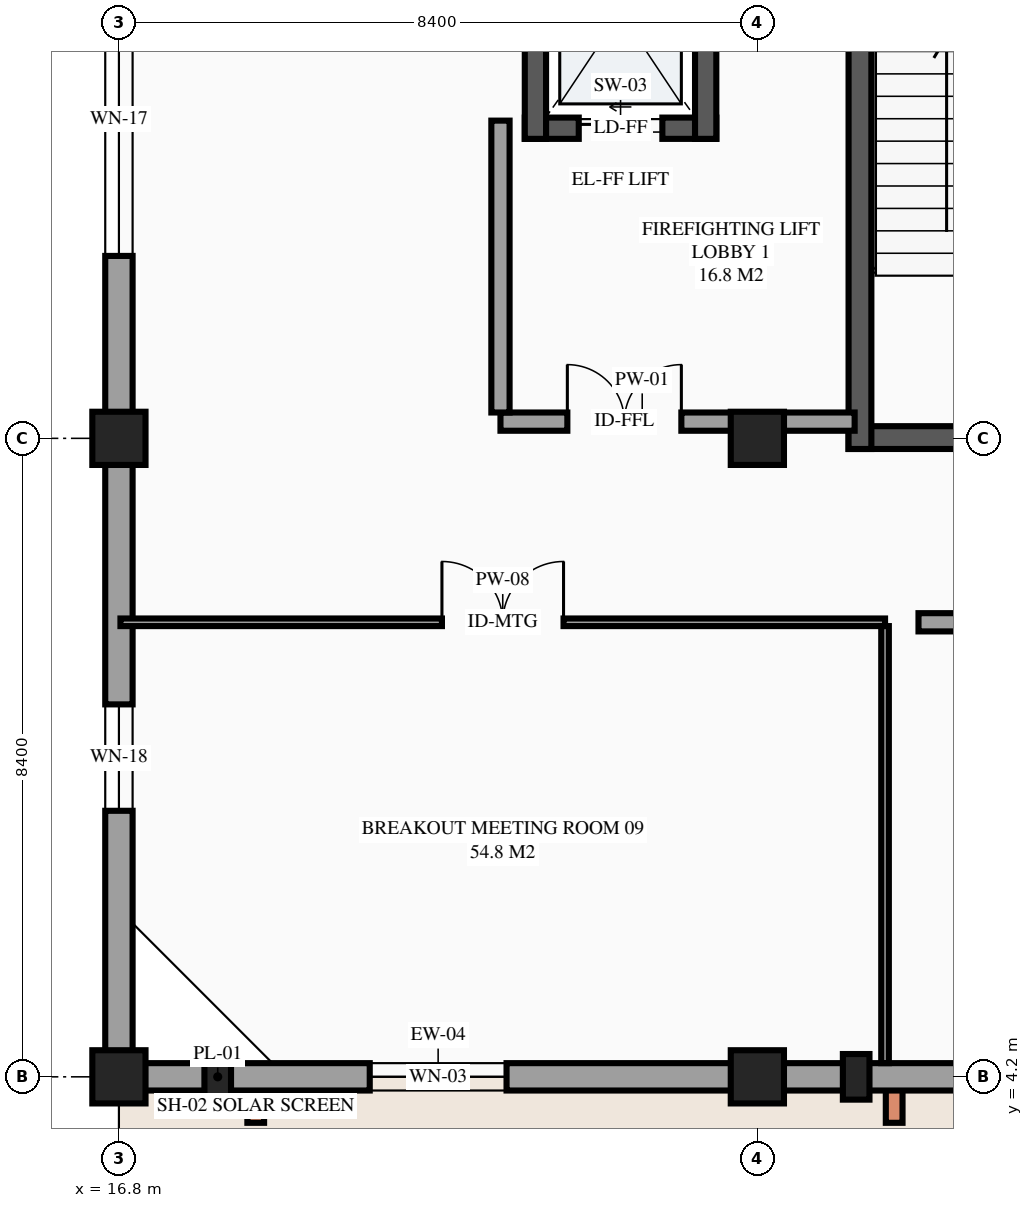
"""IFC4 building model, lengths in metres.
Left out: names, types, materials, properties, quantities, classifications, styles, units other than length and angle.
Written with IfcOpenShell. Run it as: python <this file> out.ifc"""

import sys

from ifc_helpers import new_model, si_unit, direction, frame, frame_2d, origin, origin_2d, place, context, subcontext, project, spatial, rectangle, extrude, element, fill, save


model = new_model("IFC4")
c1 = context("Model", 3, precision=1e-05, world=origin(), true_north=direction((0.0, 1.0)))
c2 = subcontext(c1, "Body", "Model", "MODEL_VIEW")
j1 = project(units=[si_unit("LENGTHUNIT", "METRE"), si_unit("PLANEANGLEUNIT", "RADIAN")], contexts=[c1])
p1 = place(None, origin())
s1 = spatial("IfcSite", under=j1, at=p1, CompositionType="ELEMENT")
p2 = place(p1, origin())
s2 = spatial("IfcBuilding", under=s1, at=p2, CompositionType="ELEMENT")
p3 = place(p2, frame((0.0, 0.0, 9.9)))
s3 = spatial("IfcBuildingStorey", under=s2, at=p3, CompositionType="ELEMENT", Elevation=9.9)
for number, where, z_axis, x_axis in (
    (1, (16.8, 4.2, 0.0), (0.0, 0.0, 1.0), (1.0, 0.0, 0.0)),
    (2, (16.8, 12.6, 0.0), (0.0, 0.0, 1.0), (1.0, 0.0, 0.0)),
    (3, (25.2, 4.2, 0.0), (0.0, 0.0, 1.0), (1.0, 0.0, 0.0)),
    (4, (25.2, 12.6, 0.0), (0.0, 0.0, 1.0), (1.0, 0.0, 0.0)),
):
    element("IfcColumn", number, at=place(p3, frame(where, z_axis=z_axis, x_axis=x_axis)), inside=s3, PredefinedType="COLUMN", context=c2, shape_type="SweptSolid", body=[
        extrude(rectangle(XDim=0.7, YDim=0.7, at=origin_2d()), origin(), (0.0, 0.0, 1.0), 4.2),
    ])
for number, where, z_axis, x_axis in (
    (5, (18.1, 4.2, 0.0), (0.0, 0.0, 1.0), (1.0, 0.0, 0.0)),
    (6, (26.5, 4.2, 0.0), (0.0, 0.0, 1.0), (1.0, 0.0, 0.0)),
):
    element("IfcColumn", number, at=place(p3, frame(where, z_axis=z_axis, x_axis=x_axis)), inside=s3, PredefinedType="PILASTER", context=c2, shape_type="SweptSolid", body=[
        extrude(rectangle(XDim=0.35, YDim=0.6, at=origin_2d()), origin(), (0.0, 0.0, 1.0), 4.2),
    ])
p4 = place(p3, frame((16.8, 4.2, 0.0), z_axis=(0.0, 0.0, 1.0), x_axis=(1.0, 0.0, 0.0)))
e7 = element("IfcWall", 7, at=p4, inside=s3, PredefinedType="STANDARD", context=c2, shape_type="SweptSolid", body=[
    extrude(rectangle(XDim=8.4, YDim=0.36, at=frame_2d((4.2, 0.0))), origin(), (0.0, 0.0, 1.0), 3.713),
])
p5 = place(p4, frame((3.3, 0.0, 0.75)))
e8 = element("IfcOpeningElement", 8, at=p5, cuts=e7, PredefinedType="OPENING", context=c2, shape_type="SweptSolid", body=[
    extrude(rectangle(XDim=1.8, YDim=1.5, at=frame_2d((0.9, 0.75))), frame((0.0, 0.19, 0.0), z_axis=(0.0, -1.0, 0.0), x_axis=(1.0, 0.0, 0.0)), (0.0, 0.0, 1.0), 0.38),
])
p6 = place(p3, frame((25.2, 4.2, 0.0), z_axis=(0.0, 0.0, 1.0), x_axis=(1.0, 0.0, 0.0)))
e9 = element("IfcWall", 9, at=p6, inside=s3, PredefinedType="STANDARD", context=c2, shape_type="SweptSolid", body=[
    extrude(rectangle(XDim=8.4, YDim=0.36, at=frame_2d((4.2, 0.0))), origin(), (0.0, 0.0, 1.0), 3.427),
])
p7 = place(p6, frame((3.15, 0.0, 0.75)))
e10 = element("IfcOpeningElement", 10, at=p7, cuts=e9, PredefinedType="OPENING", context=c2, shape_type="SweptSolid", body=[
    extrude(rectangle(XDim=2.1, YDim=1.5, at=frame_2d((1.05, 0.75))), frame((0.0, 0.19, 0.0), z_axis=(0.0, -1.0, 0.0), x_axis=(1.0, 0.0, 0.0)), (0.0, 0.0, 1.0), 0.38),
])
p8 = place(p3, frame((16.8, 21.0, 0.0), z_axis=(0.0, 0.0, 1.0), x_axis=(0.0, -1.0, 0.0)))
e11 = element("IfcWall", 11, at=p8, inside=s3, PredefinedType="STANDARD", context=c2, shape_type="SweptSolid", body=[
    extrude(rectangle(XDim=8.4, YDim=0.36, at=frame_2d((4.2, 0.0))), origin(), (0.0, 0.0, 1.0), 4.2),
])
p9 = place(p8, frame((2.4, 0.0, 0.8)))
e12 = element("IfcOpeningElement", 12, at=p9, cuts=e11, PredefinedType="OPENING", context=c2, shape_type="SweptSolid", body=[
    extrude(rectangle(XDim=3.6, YDim=1.2, at=frame_2d((1.8, 0.6))), frame((0.0, 0.19, 0.0), z_axis=(0.0, -1.0, 0.0), x_axis=(1.0, 0.0, 0.0)), (0.0, 0.0, 1.0), 0.38),
])
p10 = place(p3, frame((16.8, 12.6, 0.0), z_axis=(0.0, 0.0, 1.0), x_axis=(0.0, -1.0, 0.0)))
e13 = element("IfcWall", 13, at=p10, inside=s3, PredefinedType="STANDARD", context=c2, shape_type="SweptSolid", body=[
    extrude(rectangle(XDim=8.4, YDim=0.36, at=frame_2d((4.2, 0.0))), origin(), (0.0, 0.0, 1.0), 3.16),
])
p11 = place(p10, frame((3.5, 0.0, 0.8)))
e14 = element("IfcOpeningElement", 14, at=p11, cuts=e13, PredefinedType="OPENING", context=c2, shape_type="SweptSolid", body=[
    extrude(rectangle(XDim=1.4, YDim=1.4, at=frame_2d((0.7, 0.7))), frame((0.0, 0.19, 0.0), z_axis=(0.0, -1.0, 0.0), x_axis=(1.0, 0.0, 0.0)), (0.0, 0.0, 1.0), 0.38),
])
p12 = place(p3, frame((22.14, 16.68, 0.0), z_axis=(0.0, 0.0, 1.0), x_axis=(1.0, 0.0, 0.0)))
e15 = element("IfcWall", 15, at=p12, inside=s3, PredefinedType="SHEAR", context=c2, shape_type="SweptSolid", body=[
    extrude(rectangle(XDim=2.52, YDim=0.28, at=frame_2d((1.26, 0.0))), origin(), (0.0, 0.0, 1.0), 4.2),
])
p13 = place(p12, frame((0.71, 0.0, 0.0)))
e16 = element("IfcOpeningElement", 16, at=p13, cuts=e15, PredefinedType="OPENING", context=c2, shape_type="SweptSolid", body=[
    extrude(rectangle(XDim=1.1, YDim=2.2, at=frame_2d((0.55, 1.1))), frame((0.0, 0.15, 0.0), z_axis=(0.0, -1.0, 0.0), x_axis=(1.0, 0.0, 0.0)), (0.0, 0.0, 1.0), 0.3),
])
for number, where, z_axis, x_axis in (
    (17, (24.52, 16.54, 0.0), (0.0, 0.0, 1.0), (0.0, 1.0, 0.0)),
    (18, (22.28, 19.86, 0.0), (0.0, 0.0, 1.0), (0.0, -1.0, 0.0)),
):
    element("IfcWall", number, at=place(p3, frame(where, z_axis=z_axis, x_axis=x_axis)), inside=s3, PredefinedType="SHEAR", context=c2, shape_type="SweptSolid", body=[
        extrude(rectangle(XDim=3.32, YDim=0.28, at=frame_2d((1.66, 0.0))), origin(), (0.0, 0.0, 1.0), 4.2),
    ])
p14 = place(p3, frame((26.4, 12.61, 0.0), z_axis=(0.0, 0.0, 1.0), x_axis=(1.0, 0.0, 0.0)))
e19 = element("IfcWall", 19, at=p14, inside=s3, PredefinedType="SHEAR", context=c2, shape_type="SweptSolid", body=[
    extrude(rectangle(XDim=5.2, YDim=0.3, at=frame_2d((2.6, 0.0))), origin(), (0.0, 0.0, 1.0), 4.2),
])
p15 = place(p14, frame((2.025, 0.0, 0.0)))
e20 = element("IfcOpeningElement", 20, at=p15, cuts=e19, PredefinedType="OPENING", context=c2, shape_type="SweptSolid", body=[
    extrude(rectangle(XDim=1.15, YDim=2.15, at=frame_2d((0.575, 1.075))), frame((0.0, 0.16, 0.0), z_axis=(0.0, -1.0, 0.0), x_axis=(1.0, 0.0, 0.0)), (0.0, 0.0, 1.0), 0.32),
])
p16 = place(p3, frame((26.55, 21.3, 0.0), z_axis=(0.0, 0.0, 1.0), x_axis=(0.0, -1.0, 0.0)))
e21 = element("IfcWall", 21, at=p16, inside=s3, PredefinedType="SHEAR", context=c2, shape_type="SweptSolid", body=[
    extrude(rectangle(XDim=8.84, YDim=0.3, at=frame_2d((4.42, 0.0))), origin(), (0.0, 0.0, 1.0), 4.2),
])
p17 = place(p3, frame((21.82, 12.82, 0.0), z_axis=(0.0, 0.0, 1.0), x_axis=(1.0, 0.0, 0.0)))
e22 = element("IfcWall", 22, at=p17, inside=s3, PredefinedType="PARTITIONING", context=c2, shape_type="SweptSolid", body=[
    extrude(rectangle(XDim=3.73, YDim=0.24, at=frame_2d((1.865, 0.0))), origin(), (0.0, 0.0, 1.0), 3.955),
])
p18 = place(p17, frame((0.88, 0.0, 0.0)))
e23 = element("IfcOpeningElement", 23, at=p18, cuts=e22, PredefinedType="OPENING", context=c2, shape_type="SweptSolid", body=[
    extrude(rectangle(XDim=1.5, YDim=2.15, at=frame_2d((0.75, 1.075))), frame((0.0, 0.13, 0.0), z_axis=(0.0, -1.0, 0.0), x_axis=(1.0, 0.0, 0.0)), (0.0, 0.0, 1.0), 0.26),
])
p19 = place(p3, frame((21.82, 12.94, 0.0), z_axis=(0.0, 0.0, 1.0), x_axis=(0.0, 1.0, 0.0)))
e24 = element("IfcWall", 24, at=p19, inside=s3, PredefinedType="PARTITIONING", context=c2, shape_type="SweptSolid", body=[
    extrude(rectangle(XDim=3.84, YDim=0.24, at=frame_2d((1.92, 0.0))), origin(), (0.0, 0.0, 1.0), 3.955),
])
p20 = place(p3, frame((16.82, 10.18, 0.0), z_axis=(0.0, 0.0, 1.0), x_axis=(1.0, 0.0, 0.0)))
e25 = element("IfcWall", 25, at=p20, inside=s3, PredefinedType="PARTITIONING", context=c2, shape_type="SweptSolid", body=[
    extrude(rectangle(XDim=10.06, YDim=0.1, at=frame_2d((5.03, 0.0))), origin(), (0.0, 0.0, 1.0), 3.955),
])
p21 = place(p20, frame((4.23, 0.0, 0.0)))
e26 = element("IfcOpeningElement", 26, at=p21, cuts=e25, PredefinedType="OPENING", context=c2, shape_type="SweptSolid", body=[
    extrude(rectangle(XDim=1.6, YDim=2.25, at=frame_2d((0.8, 1.125))), frame((0.0, 0.06, 0.0), z_axis=(0.0, -1.0, 0.0), x_axis=(1.0, 0.0, 0.0)), (0.0, 0.0, 1.0), 0.12),
])
p22 = place(p3, frame((26.88, 4.38, 0.0), z_axis=(0.0, 0.0, 1.0), x_axis=(0.0, 1.0, 0.0)))
e27 = element("IfcWall", 27, at=p22, inside=s3, PredefinedType="PARTITIONING", context=c2, shape_type="SweptSolid", body=[
    extrude(rectangle(XDim=5.75, YDim=0.1, at=frame_2d((2.875, 0.0))), origin(), (0.0, 0.0, 1.0), 3.955),
])
p23 = place(p3, frame((27.32, 10.18, 0.0), z_axis=(0.0, 0.0, 1.0), x_axis=(1.0, 0.0, 0.0)))
e28 = element("IfcWall", 28, at=p23, inside=s3, PredefinedType="PARTITIONING", context=c2, shape_type="SweptSolid", body=[
    extrude(rectangle(XDim=10.06, YDim=0.24, at=frame_2d((5.03, 0.0))), origin(), (0.0, 0.0, 1.0), 3.955),
])
p24 = place(p23, frame((3.18, 0.0, 0.0)))
e29 = element("IfcOpeningElement", 29, at=p24, cuts=e28, PredefinedType="OPENING", context=c2, shape_type="SweptSolid", body=[
    extrude(rectangle(XDim=1.6, YDim=2.25, at=frame_2d((0.8, 1.125))), frame((0.0, 0.13, 0.0), z_axis=(0.0, -1.0, 0.0), x_axis=(1.0, 0.0, 0.0)), (0.0, 0.0, 1.0), 0.26),
])
p25 = place(p3, frame((25.55, 12.82, 0.0), z_axis=(0.0, 0.0, 1.0), x_axis=(1.0, 0.0, 0.0)))
e30 = element("IfcWall", 30, at=p25, inside=s3, PredefinedType="PARTITIONING", context=c2, shape_type="SweptSolid", body=[
    extrude(rectangle(XDim=0.93, YDim=0.24, at=frame_2d((0.465, 0.0))), origin(), (0.0, 0.0, 1.0), 3.31),
])
p26 = place(p5, origin())
e31 = element("IfcWindow", 31, at=p26, inside=s3, PartitioningType="SINGLE_PANEL", PredefinedType="WINDOW", context=c2, shape_type="SweptSolid", body=[
    extrude(rectangle(XDim=1.8, YDim=1.5, at=frame_2d((0.9, 0.75))), frame((0.0, 0.03, 0.0), z_axis=(0.0, -1.0, 0.0), x_axis=(1.0, 0.0, 0.0)), (0.0, 0.0, 1.0), 0.06),
])
fill(e8, e31)
p27 = place(p9, origin())
e32 = element("IfcWindow", 32, at=p27, inside=s3, PartitioningType="SINGLE_PANEL", PredefinedType="WINDOW", context=c2, shape_type="SweptSolid", body=[
    extrude(rectangle(XDim=3.6, YDim=1.2, at=frame_2d((1.8, 0.6))), frame((0.0, 0.03, 0.0), z_axis=(0.0, -1.0, 0.0), x_axis=(1.0, 0.0, 0.0)), (0.0, 0.0, 1.0), 0.06),
])
fill(e12, e32)
p28 = place(p11, origin())
e33 = element("IfcWindow", 33, at=p28, inside=s3, PartitioningType="SINGLE_PANEL", PredefinedType="WINDOW", context=c2, shape_type="SweptSolid", body=[
    extrude(rectangle(XDim=1.4, YDim=1.4, at=frame_2d((0.7, 0.7))), frame((0.0, 0.03, 0.0), z_axis=(0.0, -1.0, 0.0), x_axis=(1.0, 0.0, 0.0)), (0.0, 0.0, 1.0), 0.06),
])
fill(e14, e33)
p29 = place(p13, origin())
e34 = element("IfcDoor", 34, at=p29, inside=s3, OperationType="SLIDING_TO_LEFT", PredefinedType="DOOR", context=c2, shape_type="SweptSolid", body=[
    extrude(rectangle(XDim=1.1, YDim=2.2, at=frame_2d((0.55, 1.1))), frame((0.0, 0.025, 0.0), z_axis=(0.0, -1.0, 0.0), x_axis=(1.0, 0.0, 0.0)), (0.0, 0.0, 1.0), 0.05),
])
fill(e16, e34)
p30 = place(p18, origin())
e35 = element("IfcDoor", 35, at=p30, inside=s3, OperationType="DOUBLE_DOOR_SINGLE_SWING", PredefinedType="DOOR", context=c2, shape_type="SweptSolid", body=[
    extrude(rectangle(XDim=1.5, YDim=2.15, at=frame_2d((0.75, 1.075))), frame((0.0, 0.025, 0.0), z_axis=(0.0, -1.0, 0.0), x_axis=(1.0, 0.0, 0.0)), (0.0, 0.0, 1.0), 0.05),
])
fill(e23, e35)
p31 = place(p21, origin())
e36 = element("IfcDoor", 36, at=p31, inside=s3, OperationType="DOUBLE_DOOR_SINGLE_SWING", PredefinedType="DOOR", context=c2, shape_type="SweptSolid", body=[
    extrude(rectangle(XDim=1.6, YDim=2.25, at=frame_2d((0.8, 1.125))), frame((0.0, 0.025, 0.0), z_axis=(0.0, -1.0, 0.0), x_axis=(1.0, 0.0, 0.0)), (0.0, 0.0, 1.0), 0.05),
])
fill(e26, e36)
save(model, sys.argv[1])
